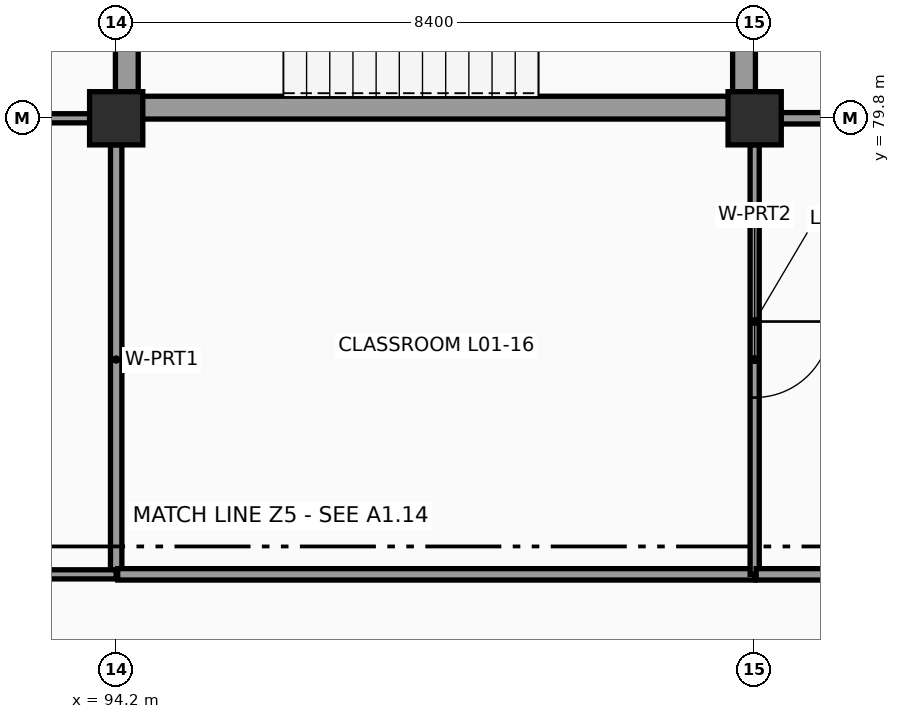
"""IFC4 building model, lengths in metres.
Left out: names, types, materials, properties, quantities, classifications, styles, units other than length and angle.
Written with IfcOpenShell. Run it as: python <this file> out.ifc"""

import sys

from ifc_helpers import new_model, si_unit, direction, frame, frame_2d, origin, origin_2d, place, context, subcontext, project, spatial, rectangle, extrude, element, fill, save


model = new_model("IFC4")
c1 = context("Model", 3, precision=1e-05, world=origin(), true_north=direction((0.0, 1.0)))
c2 = subcontext(c1, "Body", "Model", "MODEL_VIEW")
j1 = project(units=[si_unit("LENGTHUNIT", "METRE"), si_unit("PLANEANGLEUNIT", "RADIAN")], contexts=[c1])
p1 = place(None, origin())
s1 = spatial("IfcSite", under=j1, at=p1, CompositionType="ELEMENT")
p2 = place(p1, origin())
s2 = spatial("IfcBuilding", under=s1, at=p2, CompositionType="ELEMENT")
p3 = place(p2, frame((0.0, 0.0, 4.2)))
s3 = spatial("IfcBuildingStorey", under=s2, at=p3, CompositionType="ELEMENT", Elevation=4.2)
for number, where, z_axis, x_axis in (
    (1, (94.2, 79.8, 0.0), (0.0, 0.0, 1.0), (1.0, 0.0, 0.0)),
    (2, (102.6, 79.8, 0.0), (0.0, 0.0, 1.0), (1.0, 0.0, 0.0)),
):
    element("IfcColumn", number, at=place(p3, frame(where, z_axis=z_axis, x_axis=x_axis)), inside=s3, PredefinedType="COLUMN", context=c2, shape_type="SweptSolid", body=[
        extrude(rectangle(XDim=0.7, YDim=0.7, at=origin_2d()), origin(), (0.0, 0.0, 1.0), 3.6),
    ])
p4 = place(p3, frame((94.34, 79.94, 0.0), z_axis=(0.0, 0.0, 1.0), x_axis=(1.0, 0.0, 0.0)))
e3 = element("IfcWall", 3, at=p4, inside=s3, PredefinedType="SHEAR", context=c2, shape_type="SweptSolid", body=[
    extrude(rectangle(XDim=8.12, YDim=0.3, at=frame_2d((4.06, 0.0))), origin(), (0.0, 0.0, 1.0), 3.6),
])
for number, where, z_axis, x_axis in (
    (4, (102.46, 79.94, 0.0), (0.0, 0.0, 1.0), (0.0, 1.0, 0.0)),
    (5, (94.34, 84.22, 0.0), (0.0, 0.0, 1.0), (0.0, -1.0, 0.0)),
):
    element("IfcWall", number, at=place(p3, frame(where, z_axis=z_axis, x_axis=x_axis)), inside=s3, PredefinedType="SHEAR", context=c2, shape_type="SweptSolid", body=[
        extrude(rectangle(XDim=4.28, YDim=0.3, at=frame_2d((2.14, 0.0))), origin(), (0.0, 0.0, 1.0), 3.6),
    ])
p5 = place(p3, frame((106.8, 79.8, 0.0), z_axis=(0.0, 0.0, 1.0), x_axis=(-1.0, 0.0, 0.0)))
e6 = element("IfcWall", 6, at=p5, inside=s3, PredefinedType="PARTITIONING", context=c2, shape_type="SweptSolid", body=[
    extrude(rectangle(XDim=3.852, YDim=0.15, at=frame_2d((1.926, 0.0))), origin(), (0.0, 0.0, 1.0), 2.87),
])
p6 = place(p3, frame((86.148, 79.8, 0.0), z_axis=(0.0, 0.0, 1.0), x_axis=(1.0, 0.0, 0.0)))
e7 = element("IfcWall", 7, at=p6, inside=s3, PredefinedType="PARTITIONING", context=c2, shape_type="SweptSolid", body=[
    extrude(rectangle(XDim=7.704, YDim=0.12, at=frame_2d((3.852, 0.0))), origin(), (0.0, 0.0, 1.0), 2.87),
])
p7 = place(p3, frame((94.2, 79.452, 0.0), z_axis=(0.0, 0.0, 1.0), x_axis=(0.0, -1.0, 0.0)))
e8 = element("IfcWall", 8, at=p7, inside=s3, PredefinedType="PARTITIONING", context=c2, shape_type="SweptSolid", body=[
    extrude(rectangle(XDim=5.652, YDim=0.15, at=frame_2d((2.826, 0.0))), origin(), (0.0, 0.0, 1.0), 2.96),
])
p8 = place(p3, frame((94.2, 73.8, 0.0), z_axis=(0.0, 0.0, 1.0), x_axis=(-1.0, 0.0, 0.0)))
e9 = element("IfcWall", 9, at=p8, inside=s3, PredefinedType="PARTITIONING", context=c2, shape_type="SweptSolid", body=[
    extrude(rectangle(XDim=8.4, YDim=0.12, at=frame_2d((4.2, 0.0))), origin(), (0.0, 0.0, 1.0), 2.92),
])
p9 = place(p3, frame((102.6, 73.8, 0.0), z_axis=(0.0, 0.0, 1.0), x_axis=(-1.0, 0.0, 0.0)))
e10 = element("IfcWall", 10, at=p9, inside=s3, PredefinedType="PARTITIONING", context=c2, shape_type="SweptSolid", body=[
    extrude(rectangle(XDim=8.38, YDim=0.15, at=frame_2d((4.19, 0.0))), origin(), (0.0, 0.0, 1.0), 2.67),
])
p10 = place(p3, frame((102.6, 79.452, 0.0), z_axis=(0.0, 0.0, 1.0), x_axis=(0.0, -1.0, 0.0)))
e11 = element("IfcWall", 11, at=p10, inside=s3, PredefinedType="PARTITIONING", context=c2, shape_type="SweptSolid", body=[
    extrude(rectangle(XDim=5.652, YDim=0.12, at=frame_2d((2.826, 0.0))), origin(), (0.0, 0.0, 1.0), 2.67),
])
p11 = place(p10, frame((2.326, 0.0, 0.0)))
e12 = element("IfcOpeningElement", 12, at=p11, cuts=e11, PredefinedType="OPENING", context=c2, shape_type="SweptSolid", body=[
    extrude(rectangle(XDim=1.0, YDim=2.1, at=frame_2d((0.5, 1.05))), frame((0.0, 0.07, 0.0), z_axis=(0.0, -1.0, 0.0), x_axis=(1.0, 0.0, 0.0)), (0.0, 0.0, 1.0), 0.14),
])
p12 = place(p3, frame((110.577, 73.8, 0.0), z_axis=(0.0, 0.0, 1.0), x_axis=(-1.0, 0.0, 0.0)))
e13 = element("IfcWall", 13, at=p12, inside=s3, PredefinedType="PARTITIONING", context=c2, shape_type="SweptSolid", body=[
    extrude(rectangle(XDim=7.957, YDim=0.15, at=frame_2d((3.979, 0.0))), origin(), (0.0, 0.0, 1.0), 2.67),
])
p13 = place(p12, frame((3.404, 0.0, 0.0)))
e14 = element("IfcOpeningElement", 14, at=p13, cuts=e13, PredefinedType="OPENING", context=c2, shape_type="SweptSolid", body=[
    extrude(rectangle(XDim=1.15, YDim=2.15, at=frame_2d((0.575, 1.075))), frame((0.0, 0.085, 0.0), z_axis=(0.0, -1.0, 0.0), x_axis=(1.0, 0.0, 0.0)), (0.0, 0.0, 1.0), 0.17),
])
p14 = place(p11, origin())
e15 = element("IfcDoor", 15, at=p14, inside=s3, OperationType="SINGLE_SWING_LEFT", PredefinedType="DOOR", context=c2, shape_type="SweptSolid", body=[
    extrude(rectangle(XDim=1.0, YDim=2.1, at=frame_2d((0.5, 1.05))), frame((0.0, 0.025, 0.0), z_axis=(0.0, -1.0, 0.0), x_axis=(1.0, 0.0, 0.0)), (0.0, 0.0, 1.0), 0.05),
])
fill(e12, e15)
save(model, sys.argv[1])
